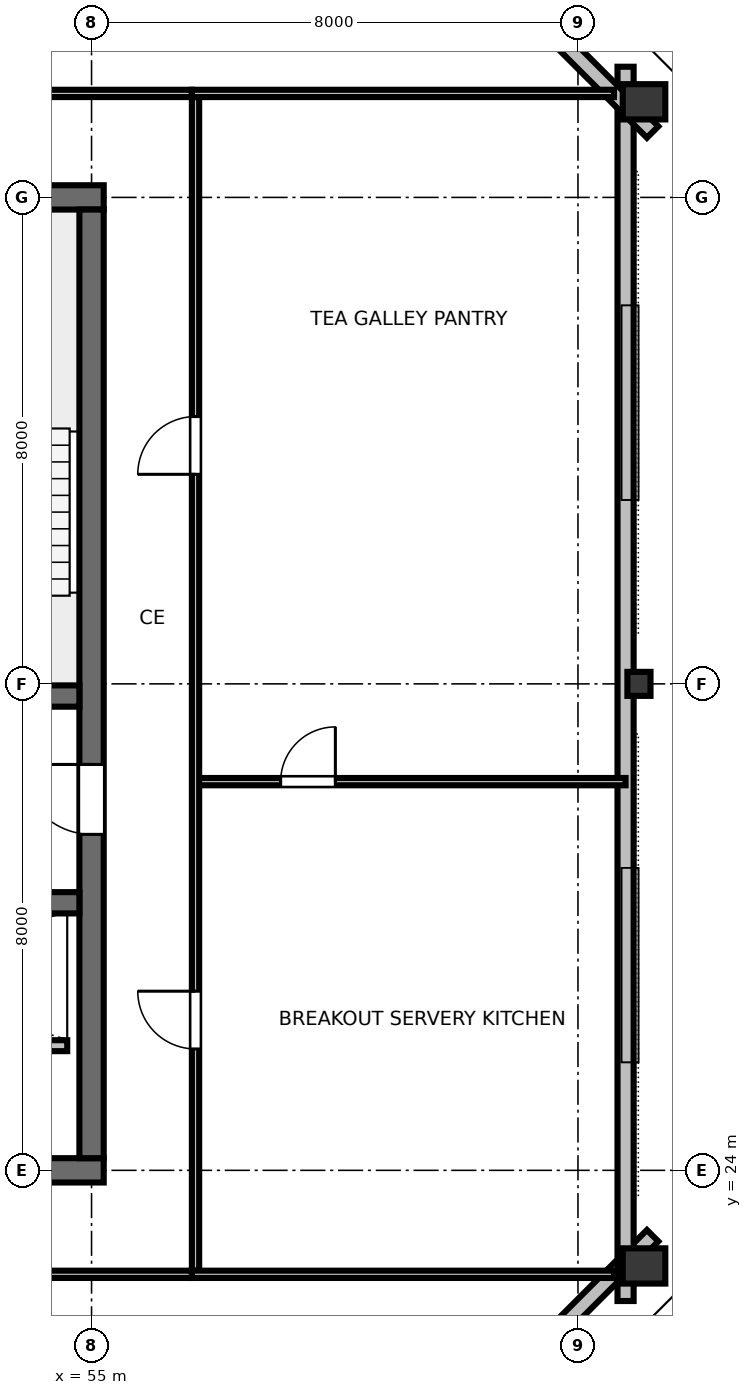
"""IFC4 building model, lengths in metres.
Left out: names, types, materials, properties, quantities, classifications, styles, units other than length and angle.
Written with IfcOpenShell. Run it as: python <this file> out.ifc"""

import sys

from ifc_helpers import new_model, si_unit, direction, frame, frame_2d, origin, origin_2d, place, context, subcontext, project, spatial, rectangle, hollow_rectangle, i_section, extrude, element, fill, save


model = new_model("IFC4")
c1 = context("Model", 3, precision=1e-05, world=origin(), true_north=direction((0.0, 1.0)))
c2 = subcontext(c1, "Body", "Model", "MODEL_VIEW")
j1 = project(units=[si_unit("LENGTHUNIT", "METRE"), si_unit("PLANEANGLEUNIT", "RADIAN")], contexts=[c1])
p1 = place(None, origin())
s1 = spatial("IfcSite", under=j1, at=p1, CompositionType="ELEMENT")
p2 = place(p1, origin())
s2 = spatial("IfcBuilding", under=s1, at=p2, CompositionType="ELEMENT")
p3 = place(p2, frame((0.0, 0.0, 261.0)))
s3 = spatial("IfcBuildingStorey", under=s2, at=p3, CompositionType="ELEMENT", Elevation=261.0)
p4 = place(p3, frame((36.8, 24.0, 0.0), z_axis=(0.0, 0.0, 1.0), x_axis=(1.0, 0.0, 0.0)))
e1 = element("IfcWall", 1, at=p4, inside=s3, PredefinedType="SHEAR", context=c2, shape_type="SweptSolid", body=[
    extrude(rectangle(XDim=18.4, YDim=0.4, at=frame_2d((9.2, 0.0))), origin(), (0.0, 0.0, 1.0), 3.36),
])
p5 = place(p4, frame((13.4, 0.0, 0.0)))
e2 = element("IfcOpeningElement", 2, at=p5, cuts=e1, PredefinedType="OPENING", context=c2, shape_type="SweptSolid", body=[
    extrude(rectangle(XDim=1.6, YDim=2.15, at=frame_2d((0.8, 1.075))), frame((0.0, 0.21, 0.0), z_axis=(0.0, -1.0, 0.0), x_axis=(1.0, 0.0, 0.0)), (0.0, 0.0, 1.0), 0.42),
])
p6 = place(p3, frame((36.8, 40.0, 0.0), z_axis=(0.0, 0.0, 1.0), x_axis=(1.0, 0.0, 0.0)))
e3 = element("IfcWall", 3, at=p6, inside=s3, PredefinedType="SHEAR", context=c2, shape_type="SweptSolid", body=[
    extrude(rectangle(XDim=18.4, YDim=0.4, at=frame_2d((9.2, 0.0))), origin(), (0.0, 0.0, 1.0), 3.36),
])
p7 = place(p6, frame((8.7, 0.0, 0.0)))
e4 = element("IfcOpeningElement", 4, at=p7, cuts=e3, PredefinedType="OPENING", context=c2, shape_type="SweptSolid", body=[
    extrude(rectangle(XDim=1.0, YDim=2.15, at=frame_2d((0.5, 1.075))), frame((0.0, 0.21, 0.0), z_axis=(0.0, -1.0, 0.0), x_axis=(1.0, 0.0, 0.0)), (0.0, 0.0, 1.0), 0.42),
])
p8 = place(p3, frame((55.0, 24.2, 0.0), z_axis=(0.0, 0.0, 1.0), x_axis=(0.0, 1.0, 0.0)))
e5 = element("IfcWall", 5, at=p8, inside=s3, PredefinedType="SHEAR", context=c2, shape_type="SweptSolid", body=[
    extrude(rectangle(XDim=15.6, YDim=0.4, at=frame_2d((7.8, 0.0))), origin(), (0.0, 0.0, 1.0), 3.36),
])
p9 = place(p8, frame((5.325, 0.0, 0.0)))
e6 = element("IfcOpeningElement", 6, at=p9, cuts=e5, PredefinedType="OPENING", context=c2, shape_type="SweptSolid", body=[
    extrude(rectangle(XDim=1.15, YDim=2.15, at=frame_2d((0.575, 1.075))), frame((0.0, 0.21, 0.0), z_axis=(0.0, -1.0, 0.0), x_axis=(1.0, 0.0, 0.0)), (0.0, 0.0, 1.0), 0.42),
])
p10 = place(p3, frame((37.2, 31.8, 0.0), z_axis=(0.0, 0.0, 1.0), x_axis=(1.0, 0.0, 0.0)))
e7 = element("IfcWall", 7, at=p10, inside=s3, PredefinedType="SHEAR", context=c2, shape_type="SweptSolid", body=[
    extrude(rectangle(XDim=17.6, YDim=0.35, at=frame_2d((8.8, 0.0))), origin(), (0.0, 0.0, 1.0), 3.36),
])
p11 = place(p10, frame((0.85, 0.0, 0.0)))
e8 = element("IfcOpeningElement", 8, at=p11, cuts=e7, PredefinedType="OPENING", context=c2, shape_type="SweptSolid", body=[
    extrude(rectangle(XDim=1.1, YDim=2.15, at=frame_2d((0.55, 1.075))), frame((0.0, 0.185, 0.0), z_axis=(0.0, -1.0, 0.0), x_axis=(1.0, 0.0, 0.0)), (0.0, 0.0, 1.0), 0.37),
])
p12 = place(p10, frame((14.75, 0.0, 0.0)))
e9 = element("IfcOpeningElement", 9, at=p12, cuts=e7, PredefinedType="OPENING", context=c2, shape_type="SweptSolid", body=[
    extrude(rectangle(XDim=1.1, YDim=2.15, at=frame_2d((0.55, 1.075))), frame((0.0, 0.185, 0.0), z_axis=(0.0, -1.0, 0.0), x_axis=(1.0, 0.0, 0.0)), (0.0, 0.0, 1.0), 0.37),
])
p13 = place(p3, frame((37.2, 28.4, 0.0), z_axis=(0.0, 0.0, 1.0), x_axis=(1.0, 0.0, 0.0)))
e10 = element("IfcWall", 10, at=p13, inside=s3, PredefinedType="SHEAR", context=c2, shape_type="SweptSolid", body=[
    extrude(rectangle(XDim=17.6, YDim=0.35, at=frame_2d((8.8, 0.0))), origin(), (0.0, 0.0, 1.0), 3.36),
])
p14 = place(p3, frame((64.086, 22.428, 0.0), z_axis=(0.0, 0.0, 1.0), x_axis=(0.0, 1.0, 0.0)))
e11 = element("IfcColumn", 11, at=p14, inside=s3, PredefinedType="COLUMN", context=c2, shape_type="SweptSolid", body=[
    extrude(hollow_rectangle(XDim=0.58, YDim=0.7, WallThickness=0.032, at=origin_2d()), origin(), (0.0, 0.0, 1.0), 3.373),
])
p15 = place(p3, frame((64.003, 32.0, 0.0), z_axis=(0.0, 0.0, 1.0), x_axis=(0.0, 1.0, 0.0)))
e12 = element("IfcColumn", 12, at=p15, inside=s3, PredefinedType="COLUMN", context=c2, shape_type="SweptSolid", body=[
    extrude(i_section(OverallWidth=0.395, OverallDepth=0.38, WebThickness=0.019, FlangeThickness=0.03, FilletRadius=0.025, at=origin_2d()), origin(), (0.0, 0.0, 1.0), 3.373),
])
p16 = place(p3, frame((64.086, 41.572, 0.0), z_axis=(0.0, 0.0, 1.0), x_axis=(0.0, 1.0, 0.0)))
e13 = element("IfcColumn", 13, at=p16, inside=s3, PredefinedType="COLUMN", context=c2, shape_type="SweptSolid", body=[
    extrude(hollow_rectangle(XDim=0.58, YDim=0.7, WallThickness=0.032, at=origin_2d()), origin(), (0.0, 0.0, 1.0), 3.373),
])
p17 = place(p3, frame((56.47, 15.168, 0.0), z_axis=(0.0, 0.0, 1.0), x_axis=(0.707106781187, 0.707106781187, 0.0)))
e14 = element("IfcWall", 14, at=p17, inside=s3, PredefinedType="STANDARD", context=c2, shape_type="SweptSolid", body=[
    extrude(rectangle(XDim=10.971, YDim=0.265, at=frame_2d((5.485, 0.0))), origin(), (0.0, 0.0, 1.0), 2.832),
])
p18 = place(p3, frame((63.783, 21.851, 0.0), z_axis=(0.0, 0.0, 1.0), x_axis=(0.0, 1.0, 0.0)))
e15 = element("IfcWall", 15, at=p18, inside=s3, PredefinedType="STANDARD", context=c2, shape_type="SweptSolid", body=[
    extrude(rectangle(XDim=20.298, YDim=0.265, at=frame_2d((10.149, 0.0))), origin(), (0.0, 0.0, 1.0), 2.832),
])
p19 = place(p3, frame((64.228, 41.075, 0.0), z_axis=(0.0, 0.0, 1.0), x_axis=(-0.707106781187, 0.707106781187, 0.0)))
e16 = element("IfcWall", 16, at=p19, inside=s3, PredefinedType="STANDARD", context=c2, shape_type="SweptSolid", body=[
    extrude(rectangle(XDim=10.971, YDim=0.265, at=frame_2d((5.485, 0.0))), origin(), (0.0, 0.0, 1.0), 2.832),
])
p20 = place(p3, frame((47.6, 26.05, 0.0), z_axis=(0.0, 0.0, 1.0), x_axis=(1.0, 0.0, 0.0)))
e17 = element("IfcWall", 17, at=p20, inside=s3, PredefinedType="PARTITIONING", context=c2, shape_type="SweptSolid", body=[
    extrude(rectangle(XDim=7.0, YDim=0.18, at=frame_2d((3.5, 0.0))), origin(), (0.0, 0.0, 1.0), 3.375),
])
p21 = place(p20, frame((1.2, 0.0, 0.0)))
e18 = element("IfcOpeningElement", 18, at=p21, cuts=e17, PredefinedType="OPENING", context=c2, shape_type="SweptSolid", body=[
    extrude(rectangle(XDim=1.05, YDim=2.15, at=frame_2d((0.525, 1.075))), frame((0.0, 0.1, 0.0), z_axis=(0.0, -1.0, 0.0), x_axis=(1.0, 0.0, 0.0)), (0.0, 0.0, 1.0), 0.2),
])
p22 = place(p20, frame((3.4, 0.0, 0.0)))
e19 = element("IfcOpeningElement", 19, at=p22, cuts=e17, PredefinedType="OPENING", context=c2, shape_type="SweptSolid", body=[
    extrude(rectangle(XDim=1.05, YDim=2.15, at=frame_2d((0.525, 1.075))), frame((0.0, 0.1, 0.0), z_axis=(0.0, -1.0, 0.0), x_axis=(1.0, 0.0, 0.0)), (0.0, 0.0, 1.0), 0.2),
])
p23 = place(p3, frame((35.35, 22.29, 0.0), z_axis=(0.0, 0.0, 1.0), x_axis=(1.0, 0.0, 0.0)))
e20 = element("IfcWall", 20, at=p23, inside=s3, PredefinedType="PARTITIONING", context=c2, shape_type="SweptSolid", body=[
    extrude(rectangle(XDim=21.3, YDim=0.12, at=frame_2d((10.65, 0.0))), origin(), (0.0, 0.0, 1.0), 2.655),
])
p24 = place(p23, frame((4.425, 0.0, 0.0)))
e21 = element("IfcOpeningElement", 21, at=p24, cuts=e20, PredefinedType="OPENING", context=c2, shape_type="SweptSolid", body=[
    extrude(rectangle(XDim=0.95, YDim=2.15, at=frame_2d((0.475, 1.075))), frame((0.0, 0.07, 0.0), z_axis=(0.0, -1.0, 0.0), x_axis=(1.0, 0.0, 0.0)), (0.0, 0.0, 1.0), 0.14),
])
p25 = place(p23, frame((13.051, 0.0, 0.0)))
e22 = element("IfcOpeningElement", 22, at=p25, cuts=e20, PredefinedType="OPENING", context=c2, shape_type="SweptSolid", body=[
    extrude(rectangle(XDim=0.95, YDim=2.15, at=frame_2d((0.475, 1.075))), frame((0.0, 0.07, 0.0), z_axis=(0.0, -1.0, 0.0), x_axis=(1.0, 0.0, 0.0)), (0.0, 0.0, 1.0), 0.14),
])
p26 = place(p23, frame((17.811, 0.0, 0.0)))
e23 = element("IfcOpeningElement", 23, at=p26, cuts=e20, PredefinedType="OPENING", context=c2, shape_type="SweptSolid", body=[
    extrude(rectangle(XDim=0.95, YDim=2.15, at=frame_2d((0.475, 1.075))), frame((0.0, 0.07, 0.0), z_axis=(0.0, -1.0, 0.0), x_axis=(1.0, 0.0, 0.0)), (0.0, 0.0, 1.0), 0.14),
])
p27 = place(p3, frame((35.35, 41.71, 0.0), z_axis=(0.0, 0.0, 1.0), x_axis=(1.0, 0.0, 0.0)))
e24 = element("IfcWall", 24, at=p27, inside=s3, PredefinedType="PARTITIONING", context=c2, shape_type="SweptSolid", body=[
    extrude(rectangle(XDim=21.3, YDim=0.12, at=frame_2d((10.65, 0.0))), origin(), (0.0, 0.0, 1.0), 2.655),
])
p28 = place(p27, frame((4.361, 0.0, 0.0)))
e25 = element("IfcOpeningElement", 25, at=p28, cuts=e24, PredefinedType="OPENING", context=c2, shape_type="SweptSolid", body=[
    extrude(rectangle(XDim=0.95, YDim=2.15, at=frame_2d((0.475, 1.075))), frame((0.0, 0.07, 0.0), z_axis=(0.0, -1.0, 0.0), x_axis=(1.0, 0.0, 0.0)), (0.0, 0.0, 1.0), 0.14),
])
p29 = place(p27, frame((15.925, 0.0, 0.0)))
e26 = element("IfcOpeningElement", 26, at=p29, cuts=e24, PredefinedType="OPENING", context=c2, shape_type="SweptSolid", body=[
    extrude(rectangle(XDim=0.95, YDim=2.15, at=frame_2d((0.475, 1.075))), frame((0.0, 0.07, 0.0), z_axis=(0.0, -1.0, 0.0), x_axis=(1.0, 0.0, 0.0)), (0.0, 0.0, 1.0), 0.14),
])
p30 = place(p3, frame((56.71, 30.392, 0.0), z_axis=(0.0, 0.0, 1.0), x_axis=(1.0, 0.0, 0.0)))
e27 = element("IfcWall", 27, at=p30, inside=s3, PredefinedType="PARTITIONING", context=c2, shape_type="SweptSolid", body=[
    extrude(rectangle(XDim=7.073, YDim=0.12, at=frame_2d((3.536, 0.0))), origin(), (0.0, 0.0, 1.0), 2.655),
])
p31 = place(p30, frame((1.4, 0.0, 0.0)))
e28 = element("IfcOpeningElement", 28, at=p31, cuts=e27, PredefinedType="OPENING", context=c2, shape_type="SweptSolid", body=[
    extrude(rectangle(XDim=0.9, YDim=2.15, at=frame_2d((0.45, 1.075))), frame((0.0, 0.07, 0.0), z_axis=(0.0, -1.0, 0.0), x_axis=(1.0, 0.0, 0.0)), (0.0, 0.0, 1.0), 0.14),
])
p32 = place(p3, frame((56.71, 22.35, 0.0), z_axis=(0.0, 0.0, 1.0), x_axis=(0.0, 1.0, 0.0)))
e29 = element("IfcWall", 29, at=p32, inside=s3, PredefinedType="PARTITIONING", context=c2, shape_type="SweptSolid", body=[
    extrude(rectangle(XDim=19.3, YDim=0.12, at=frame_2d((9.65, 0.0))), origin(), (0.0, 0.0, 1.0), 2.655),
])
p33 = place(p32, frame((3.646, 0.0, 0.0)))
e30 = element("IfcOpeningElement", 30, at=p33, cuts=e29, PredefinedType="OPENING", context=c2, shape_type="SweptSolid", body=[
    extrude(rectangle(XDim=0.95, YDim=2.15, at=frame_2d((0.475, 1.075))), frame((0.0, 0.07, 0.0), z_axis=(0.0, -1.0, 0.0), x_axis=(1.0, 0.0, 0.0)), (0.0, 0.0, 1.0), 0.14),
])
p34 = place(p32, frame((13.096, 0.0, 0.0)))
e31 = element("IfcOpeningElement", 31, at=p34, cuts=e29, PredefinedType="OPENING", context=c2, shape_type="SweptSolid", body=[
    extrude(rectangle(XDim=0.95, YDim=2.15, at=frame_2d((0.475, 1.075))), frame((0.0, 0.07, 0.0), z_axis=(0.0, -1.0, 0.0), x_axis=(1.0, 0.0, 0.0)), (0.0, 0.0, 1.0), 0.14),
])
for number, where, z_axis, x_axis in (
    (32, (56.65, 22.29, 0.0), (0.0, 0.0, 1.0), (1.0, 0.0, 0.0)),
    (33, (56.65, 41.71, 0.0), (0.0, 0.0, 1.0), (1.0, 0.0, 0.0)),
):
    element("IfcWall", number, at=place(p3, frame(where, z_axis=z_axis, x_axis=x_axis)), inside=s3, PredefinedType="PARTITIONING", context=c2, shape_type="SweptSolid", body=[
        extrude(rectangle(XDim=6.942, YDim=0.12, at=frame_2d((3.471, 0.0))), origin(), (0.0, 0.0, 1.0), 2.655),
    ])
p35 = place(p9, origin())
e34 = element("IfcDoor", 34, at=p35, inside=s3, OperationType="SINGLE_SWING_RIGHT", PredefinedType="DOOR", context=c2, shape_type="SweptSolid", body=[
    extrude(rectangle(XDim=1.15, YDim=2.15, at=frame_2d((0.575, 1.075))), frame((0.0, 0.025, 0.0), z_axis=(0.0, -1.0, 0.0), x_axis=(1.0, 0.0, 0.0)), (0.0, 0.0, 1.0), 0.05),
])
fill(e6, e34)
p36 = place(p31, origin())
e35 = element("IfcDoor", 35, at=p36, inside=s3, OperationType="SINGLE_SWING_RIGHT", PredefinedType="DOOR", context=c2, shape_type="SweptSolid", body=[
    extrude(rectangle(XDim=0.9, YDim=2.15, at=frame_2d((0.45, 1.075))), frame((0.0, 0.025, 0.0), z_axis=(0.0, -1.0, 0.0), x_axis=(1.0, 0.0, 0.0)), (0.0, 0.0, 1.0), 0.05),
])
fill(e28, e35)
p37 = place(p33, origin())
e36 = element("IfcDoor", 36, at=p37, inside=s3, OperationType="SINGLE_SWING_RIGHT", PredefinedType="DOOR", context=c2, shape_type="SweptSolid", body=[
    extrude(rectangle(XDim=0.95, YDim=2.15, at=frame_2d((0.475, 1.075))), frame((0.0, 0.025, 0.0), z_axis=(0.0, -1.0, 0.0), x_axis=(1.0, 0.0, 0.0)), (0.0, 0.0, 1.0), 0.05),
])
fill(e30, e36)
p38 = place(p34, origin())
e37 = element("IfcDoor", 37, at=p38, inside=s3, OperationType="SINGLE_SWING_LEFT", PredefinedType="DOOR", context=c2, shape_type="SweptSolid", body=[
    extrude(rectangle(XDim=0.95, YDim=2.15, at=frame_2d((0.475, 1.075))), frame((0.0, 0.025, 0.0), z_axis=(0.0, -1.0, 0.0), x_axis=(1.0, 0.0, 0.0)), (0.0, 0.0, 1.0), 0.05),
])
fill(e31, e37)
save(model, sys.argv[1])
